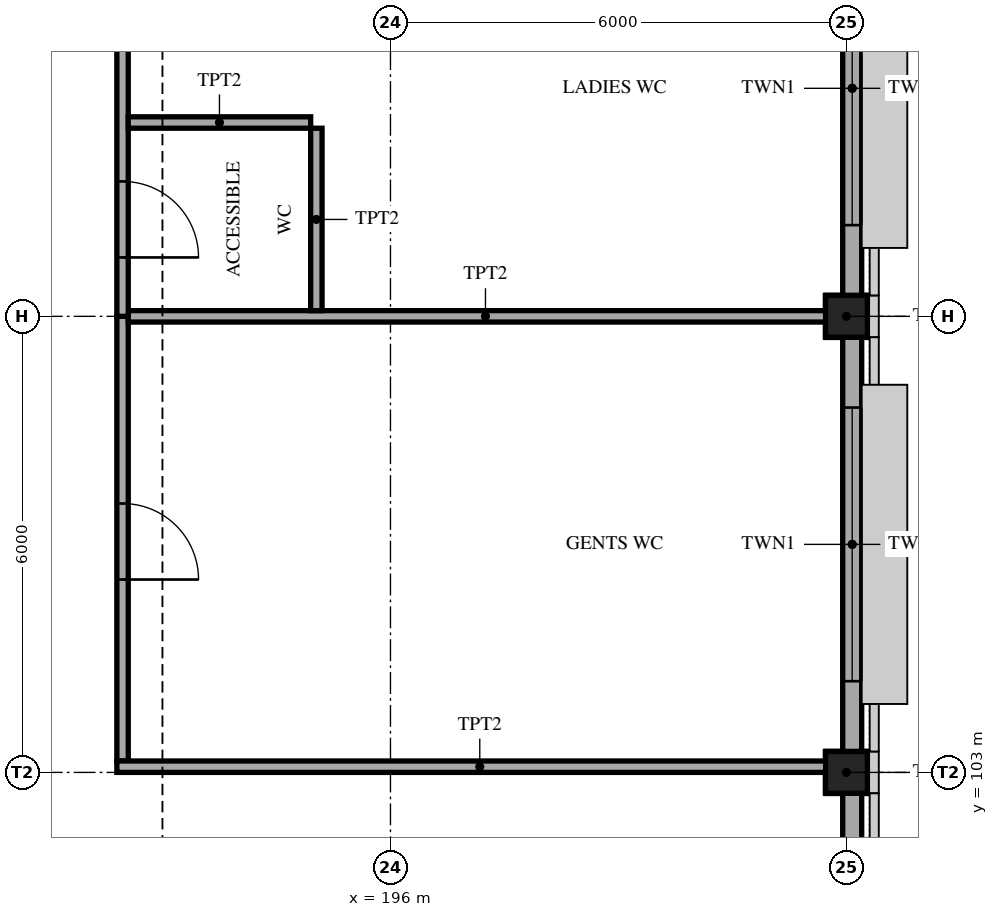
"""IFC4 building model, lengths in metres.
Left out: names, types, materials, properties, quantities, classifications, styles, units other than length and angle.
Written with IfcOpenShell. Run it as: python <this file> out.ifc"""

import sys

from ifc_helpers import new_model, si_unit, direction, frame, frame_2d, origin, origin_2d, place, context, subcontext, project, spatial, polyline, rectangle, hollow_rectangle, outline, extrude, element, fill, save


model = new_model("IFC4")
c1 = context("Model", 3, precision=1e-05, world=origin(), true_north=direction((0.0, 1.0)))
c2 = subcontext(c1, "Body", "Model", "MODEL_VIEW")
j1 = project(units=[si_unit("LENGTHUNIT", "METRE"), si_unit("PLANEANGLEUNIT", "RADIAN")], contexts=[c1])
p1 = place(None, origin())
s1 = spatial("IfcSite", under=j1, at=p1, CompositionType="ELEMENT")
p2 = place(p1, origin())
s2 = spatial("IfcBuilding", under=s1, at=p2, CompositionType="ELEMENT")
p3 = place(p2, frame((0.0, 0.0, 10.0)))
s3 = spatial("IfcBuildingStorey", under=s2, at=p3, CompositionType="ELEMENT", Elevation=10.0)
for number, where, z_axis, x_axis in (
    (1, (202.0, 103.0, 0.0), (0.0, 0.0, 1.0), (1.0, 0.0, 0.0)),
    (2, (202.0, 109.0, 0.0), (0.0, 0.0, 1.0), (1.0, 0.0, 0.0)),
):
    element("IfcColumn", number, at=place(p3, frame(where, z_axis=z_axis, x_axis=x_axis)), inside=s3, PredefinedType="COLUMN", context=c2, shape_type="SweptSolid", body=[
        extrude(hollow_rectangle(XDim=0.55, YDim=0.55, WallThickness=0.032, at=origin_2d()), origin(), (0.0, 0.0, 1.0), 5.0),
    ])
p4 = place(p3, frame((202.075, 97.275, 0.0), z_axis=(0.0, 0.0, 1.0), x_axis=(0.0, 1.0, 0.0)))
e3 = element("IfcWall", 3, at=p4, inside=s3, PredefinedType="SOLIDWALL", context=c2, shape_type="SweptSolid", body=[
    extrude(rectangle(XDim=5.45, YDim=0.25, at=frame_2d((2.725, 0.0))), origin(), (0.0, 0.0, 1.0), 4.35),
])
p5 = place(p4, frame((0.925, 0.0, 0.9)))
e4 = element("IfcOpeningElement", 4, at=p5, cuts=e3, PredefinedType="OPENING", context=c2, shape_type="SweptSolid", body=[
    extrude(rectangle(XDim=3.6, YDim=2.4, at=frame_2d((1.8, 1.2))), frame((0.0, 0.135, 0.0), z_axis=(0.0, -1.0, 0.0), x_axis=(1.0, 0.0, 0.0)), (0.0, 0.0, 1.0), 0.27),
])
p6 = place(p3, frame((202.075, 103.275, 0.0), z_axis=(0.0, 0.0, 1.0), x_axis=(0.0, 1.0, 0.0)))
e5 = element("IfcWall", 5, at=p6, inside=s3, PredefinedType="SOLIDWALL", context=c2, shape_type="SweptSolid", body=[
    extrude(rectangle(XDim=5.45, YDim=0.25, at=frame_2d((2.725, 0.0))), origin(), (0.0, 0.0, 1.0), 4.35),
])
p7 = place(p6, frame((0.925, 0.0, 0.9)))
e6 = element("IfcOpeningElement", 6, at=p7, cuts=e5, PredefinedType="OPENING", context=c2, shape_type="SweptSolid", body=[
    extrude(rectangle(XDim=3.6, YDim=2.4, at=frame_2d((1.8, 1.2))), frame((0.0, 0.135, 0.0), z_axis=(0.0, -1.0, 0.0), x_axis=(1.0, 0.0, 0.0)), (0.0, 0.0, 1.0), 0.27),
])
p8 = place(p3, frame((202.075, 109.275, 0.0), z_axis=(0.0, 0.0, 1.0), x_axis=(0.0, 1.0, 0.0)))
e7 = element("IfcWall", 7, at=p8, inside=s3, PredefinedType="SOLIDWALL", context=c2, shape_type="SweptSolid", body=[
    extrude(rectangle(XDim=5.45, YDim=0.25, at=frame_2d((2.725, 0.0))), origin(), (0.0, 0.0, 1.0), 4.35),
])
p9 = place(p8, frame((0.925, 0.0, 0.9)))
e8 = element("IfcOpeningElement", 8, at=p9, cuts=e7, PredefinedType="OPENING", context=c2, shape_type="SweptSolid", body=[
    extrude(rectangle(XDim=3.6, YDim=2.4, at=frame_2d((1.8, 1.2))), frame((0.0, 0.135, 0.0), z_axis=(0.0, -1.0, 0.0), x_axis=(1.0, 0.0, 0.0)), (0.0, 0.0, 1.0), 0.27),
])
p10 = place(p3, frame((192.475, 103.15, 0.0), z_axis=(0.0, 0.0, 1.0), x_axis=(0.0, 1.0, 0.0)))
e9 = element("IfcWall", 9, at=p10, inside=s3, PredefinedType="PARTITIONING", context=c2, shape_type="SweptSolid", body=[
    extrude(rectangle(XDim=5.85, YDim=0.15, at=frame_2d((2.925, 0.0))), origin(), (0.0, 0.0, 1.0), 4.2),
])
p11 = place(p10, frame((2.387, 0.0, 0.0)))
e10 = element("IfcOpeningElement", 10, at=p11, cuts=e9, PredefinedType="OPENING", context=c2, shape_type="SweptSolid", body=[
    extrude(rectangle(XDim=1.0, YDim=2.1, at=frame_2d((0.5, 1.05))), frame((0.0, 0.085, 0.0), z_axis=(0.0, -1.0, 0.0), x_axis=(1.0, 0.0, 0.0)), (0.0, 0.0, 1.0), 0.17),
])
p12 = place(p3, frame((192.55, 109.0, 0.0), z_axis=(0.0, 0.0, 1.0), x_axis=(1.0, 0.0, 0.0)))
e11 = element("IfcWall", 11, at=p12, inside=s3, PredefinedType="PARTITIONING", context=c2, shape_type="SweptSolid", body=[
    extrude(rectangle(XDim=9.4, YDim=0.15, at=frame_2d((4.7, 0.0))), origin(), (0.0, 0.0, 1.0), 4.2),
])
p13 = place(p3, frame((192.475, 109.0, 0.0), z_axis=(0.0, 0.0, 1.0), x_axis=(0.0, 1.0, 0.0)))
e12 = element("IfcWall", 12, at=p13, inside=s3, PredefinedType="PARTITIONING", context=c2, shape_type="SweptSolid", body=[
    extrude(rectangle(XDim=6.0, YDim=0.15, at=frame_2d((3.0, 0.0))), origin(), (0.0, 0.0, 1.0), 4.2),
])
p14 = place(p13, frame((3.7, 0.0, 0.0)))
e13 = element("IfcOpeningElement", 13, at=p14, cuts=e12, PredefinedType="OPENING", context=c2, shape_type="SweptSolid", body=[
    extrude(rectangle(XDim=1.0, YDim=2.1, at=frame_2d((0.5, 1.05))), frame((0.0, 0.085, 0.0), z_axis=(0.0, -1.0, 0.0), x_axis=(1.0, 0.0, 0.0)), (0.0, 0.0, 1.0), 0.17),
])
p15 = place(p13, frame((0.775, 0.0, 0.0)))
e14 = element("IfcOpeningElement", 14, at=p15, cuts=e12, PredefinedType="OPENING", context=c2, shape_type="SweptSolid", body=[
    extrude(rectangle(XDim=1.0, YDim=2.1, at=frame_2d((0.5, 1.05))), frame((0.0, 0.085, 0.0), z_axis=(0.0, -1.0, 0.0), x_axis=(1.0, 0.0, 0.0)), (0.0, 0.0, 1.0), 0.17),
])
p16 = place(p3, frame((195.025, 109.075, 0.0), z_axis=(0.0, 0.0, 1.0), x_axis=(0.0, 1.0, 0.0)))
e15 = element("IfcWall", 15, at=p16, inside=s3, PredefinedType="PARTITIONING", context=c2, shape_type="SweptSolid", body=[
    extrude(rectangle(XDim=2.4, YDim=0.15, at=frame_2d((1.2, 0.0))), origin(), (0.0, 0.0, 1.0), 4.2),
])
p17 = place(p3, frame((192.55, 111.55, 0.0), z_axis=(0.0, 0.0, 1.0), x_axis=(1.0, 0.0, 0.0)))
e16 = element("IfcWall", 16, at=p17, inside=s3, PredefinedType="PARTITIONING", context=c2, shape_type="SweptSolid", body=[
    extrude(rectangle(XDim=2.4, YDim=0.15, at=frame_2d((1.2, 0.0))), origin(), (0.0, 0.0, 1.0), 4.4),
])
p18 = place(p3, frame((192.4, 103.075, 0.0), z_axis=(0.0, 0.0, 1.0), x_axis=(1.0, 0.0, 0.0)))
e17 = element("IfcWall", 17, at=p18, inside=s3, PredefinedType="PARTITIONING", context=c2, shape_type="SweptSolid", body=[
    extrude(rectangle(XDim=9.55, YDim=0.15, at=frame_2d((4.775, 0.0))), origin(), (0.0, 0.0, 1.0), 4.2),
])
p19 = place(p7, origin())
e18 = element("IfcWindow", 18, at=p19, inside=s3, PartitioningType="TRIPLE_PANEL_VERTICAL", PredefinedType="WINDOW", context=c2, shape_type="SweptSolid", body=[
    extrude(outline(polyline([(0.0, 0.0), (3.6, 0.0), (3.6, 2.4), (0.0, 2.4), (0.0, 0.0)]), holes=[polyline([(0.06, 0.06), (0.96, 0.06), (0.96, 2.34), (0.06, 2.34), (0.06, 0.06)]), polyline([(1.06, 0.06), (2.54, 0.06), (2.54, 2.34), (1.06, 2.34), (1.06, 0.06)]), polyline([(2.64, 0.06), (3.54, 0.06), (3.54, 2.34), (2.64, 2.34), (2.64, 0.06)])]), frame((0.0, 0.03, 0.0), z_axis=(0.0, -1.0, 0.0), x_axis=(1.0, 0.0, 0.0)), (0.0, 0.0, 1.0), 0.06),
    extrude(rectangle(XDim=0.924, YDim=2.304, at=frame_2d((0.51, 1.2))), frame((0.0, 0.01, 0.0), z_axis=(0.0, -1.0, 0.0), x_axis=(1.0, 0.0, 0.0)), (0.0, 0.0, 1.0), 0.02),
    extrude(rectangle(XDim=1.504, YDim=2.304, at=frame_2d((1.8, 1.2))), frame((0.0, 0.01, 0.0), z_axis=(0.0, -1.0, 0.0), x_axis=(1.0, 0.0, 0.0)), (0.0, 0.0, 1.0), 0.02),
    extrude(rectangle(XDim=0.924, YDim=2.304, at=frame_2d((3.09, 1.2))), frame((0.0, 0.01, 0.0), z_axis=(0.0, -1.0, 0.0), x_axis=(1.0, 0.0, 0.0)), (0.0, 0.0, 1.0), 0.02),
])
fill(e6, e18)
p20 = place(p9, origin())
e19 = element("IfcWindow", 19, at=p20, inside=s3, PartitioningType="TRIPLE_PANEL_VERTICAL", PredefinedType="WINDOW", context=c2, shape_type="SweptSolid", body=[
    extrude(outline(polyline([(0.0, 0.0), (3.6, 0.0), (3.6, 2.4), (0.0, 2.4), (0.0, 0.0)]), holes=[polyline([(0.06, 0.06), (0.96, 0.06), (0.96, 2.34), (0.06, 2.34), (0.06, 0.06)]), polyline([(1.06, 0.06), (2.54, 0.06), (2.54, 2.34), (1.06, 2.34), (1.06, 0.06)]), polyline([(2.64, 0.06), (3.54, 0.06), (3.54, 2.34), (2.64, 2.34), (2.64, 0.06)])]), frame((0.0, 0.03, 0.0), z_axis=(0.0, -1.0, 0.0), x_axis=(1.0, 0.0, 0.0)), (0.0, 0.0, 1.0), 0.06),
    extrude(rectangle(XDim=0.924, YDim=2.304, at=frame_2d((0.51, 1.2))), frame((0.0, 0.01, 0.0), z_axis=(0.0, -1.0, 0.0), x_axis=(1.0, 0.0, 0.0)), (0.0, 0.0, 1.0), 0.02),
    extrude(rectangle(XDim=1.504, YDim=2.304, at=frame_2d((1.8, 1.2))), frame((0.0, 0.01, 0.0), z_axis=(0.0, -1.0, 0.0), x_axis=(1.0, 0.0, 0.0)), (0.0, 0.0, 1.0), 0.02),
    extrude(rectangle(XDim=0.924, YDim=2.304, at=frame_2d((3.09, 1.2))), frame((0.0, 0.01, 0.0), z_axis=(0.0, -1.0, 0.0), x_axis=(1.0, 0.0, 0.0)), (0.0, 0.0, 1.0), 0.02),
])
fill(e8, e19)
p21 = place(p11, frame((1.0, 0.0, 0.0), z_axis=(0.0, 0.0, 1.0), x_axis=(-1.0, 0.0, 0.0)))
e20 = element("IfcDoor", 20, at=p21, inside=s3, OperationType="SINGLE_SWING_RIGHT", PredefinedType="DOOR", context=c2, shape_type="SweptSolid", body=[
    extrude(rectangle(XDim=1.0, YDim=2.1, at=frame_2d((0.5, 1.05))), frame((0.0, 0.025, 0.0), z_axis=(0.0, -1.0, 0.0), x_axis=(1.0, 0.0, 0.0)), (0.0, 0.0, 1.0), 0.05),
])
fill(e10, e20)
p22 = place(p15, frame((1.0, 0.0, 0.0), z_axis=(0.0, 0.0, 1.0), x_axis=(-1.0, 0.0, 0.0)))
e21 = element("IfcDoor", 21, at=p22, inside=s3, OperationType="SINGLE_SWING_RIGHT", PredefinedType="DOOR", context=c2, shape_type="SweptSolid", body=[
    extrude(rectangle(XDim=1.0, YDim=2.1, at=frame_2d((0.5, 1.05))), frame((0.0, 0.025, 0.0), z_axis=(0.0, -1.0, 0.0), x_axis=(1.0, 0.0, 0.0)), (0.0, 0.0, 1.0), 0.05),
])
fill(e14, e21)
save(model, sys.argv[1])
